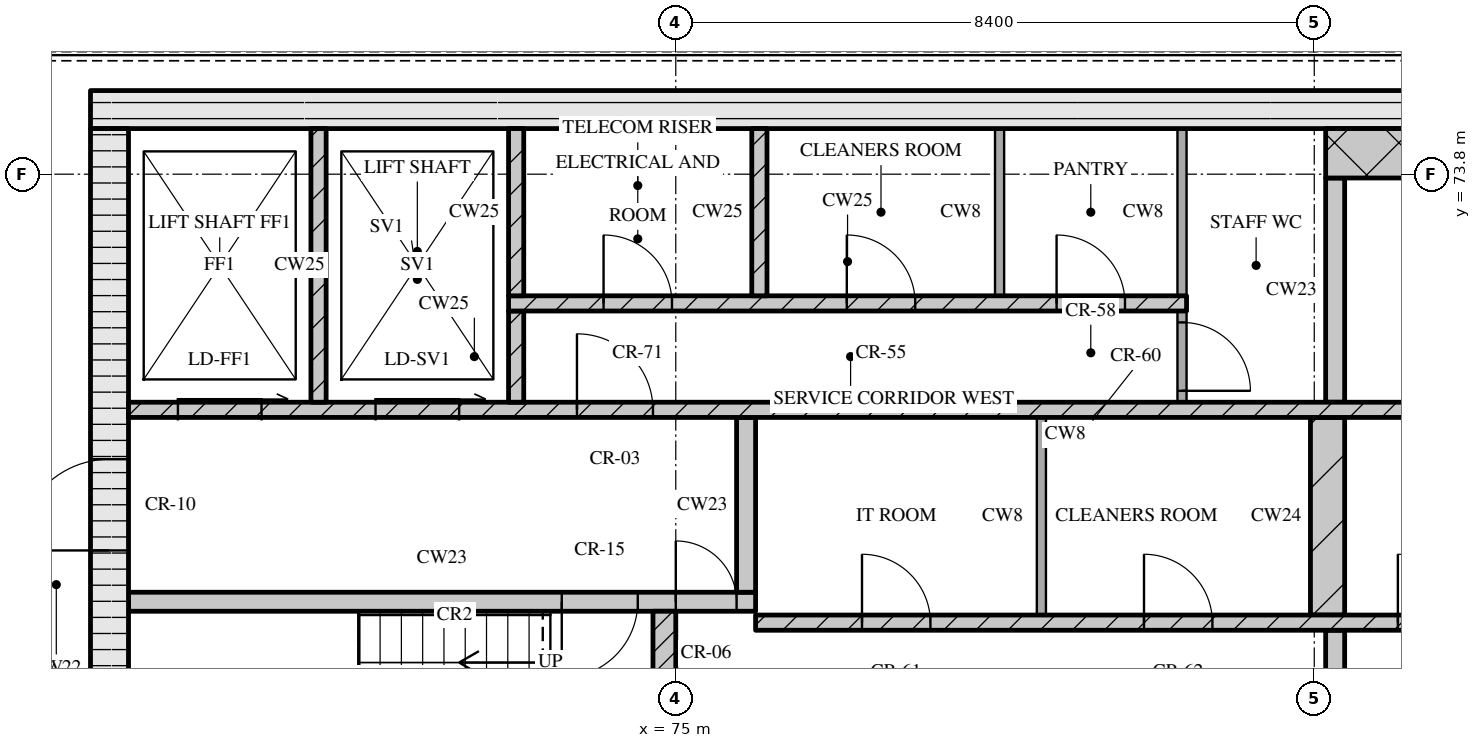
"""IFC4 building model, lengths in metres.
Left out: names, types, materials, properties, quantities, classifications, styles, units other than length and angle.
Written with IfcOpenShell. Run it as: python <this file> out.ifc"""

import sys

from ifc_helpers import new_model, si_unit, direction, frame, frame_2d, origin, place, context, subcontext, project, spatial, rectangle, extrude, element, fill, save


model = new_model("IFC4")
c1 = context("Model", 3, precision=1e-05, world=origin(), true_north=direction((0.0, 1.0)))
c2 = subcontext(c1, "Body", "Model", "MODEL_VIEW")
j1 = project(units=[si_unit("LENGTHUNIT", "METRE"), si_unit("PLANEANGLEUNIT", "RADIAN")], contexts=[c1])
p1 = place(None, origin())
s1 = spatial("IfcSite", under=j1, at=p1, CompositionType="ELEMENT")
p2 = place(p1, origin())
s2 = spatial("IfcBuilding", under=s1, at=p2, CompositionType="ELEMENT")
p3 = place(p2, frame((0.0, 0.0, 299.55)))
s3 = spatial("IfcBuildingStorey", under=s2, at=p3, CompositionType="ELEMENT", Elevation=299.55)
p4 = place(p3, frame((67.3, 74.65, 0.0), z_axis=(0.0, 0.0, 1.0), x_axis=(1.0, 0.0, 0.0)))
e1 = element("IfcWall", 1, at=p4, inside=s3, PredefinedType="SOLIDWALL", context=c2, shape_type="SweptSolid", body=[
    extrude(rectangle(XDim=40.6, YDim=0.5, at=frame_2d((20.3, 0.0))), origin(), (0.0, 0.0, 1.0), 3.32),
])
p5 = place(p3, frame((67.55, 62.4, 0.0), z_axis=(0.0, 0.0, 1.0), x_axis=(0.0, 1.0, 0.0)))
e2 = element("IfcWall", 2, at=p5, inside=s3, PredefinedType="SOLIDWALL", context=c2, shape_type="SweptSolid", body=[
    extrude(rectangle(XDim=12.0, YDim=0.5, at=frame_2d((6.0, 0.0))), origin(), (0.0, 0.0, 1.0), 3.32),
])
p6 = place(p5, frame((6.45, 0.0, 0.0)))
e3 = element("IfcOpeningElement", 3, at=p6, cuts=e2, PredefinedType="OPENING", context=c2, shape_type="SweptSolid", body=[
    extrude(rectangle(XDim=1.2, YDim=2.1, at=frame_2d((0.6, 1.05))), frame((0.0, 0.26, 0.0), z_axis=(0.0, -1.0, 0.0), x_axis=(1.0, 0.0, 0.0)), (0.0, 0.0, 1.0), 0.52),
])
p7 = place(p3, frame((74.85, 65.2, 0.0), z_axis=(0.0, 0.0, 1.0), x_axis=(0.0, 1.0, 0.0)))
e4 = element("IfcWall", 4, at=p7, inside=s3, PredefinedType="SOLIDWALL", context=c2, shape_type="SweptSolid", body=[
    extrude(rectangle(XDim=2.85, YDim=0.3, at=frame_2d((1.425, 0.0))), origin(), (0.0, 0.0, 1.0), 3.32),
])
p8 = place(p3, frame((83.675, 65.2, 0.0), z_axis=(0.0, 0.0, 1.0), x_axis=(0.0, 1.0, 0.0)))
e5 = element("IfcWall", 5, at=p8, inside=s3, PredefinedType="SOLIDWALL", context=c2, shape_type="SweptSolid", body=[
    extrude(rectangle(XDim=2.6, YDim=0.25, at=frame_2d((1.3, 0.0))), origin(), (0.0, 0.0, 1.0), 3.32),
])
p9 = place(p8, frame((0.7, 0.0, 0.0)))
e6 = element("IfcOpeningElement", 6, at=p9, cuts=e5, PredefinedType="OPENING", context=c2, shape_type="SweptSolid", body=[
    extrude(rectangle(XDim=1.2, YDim=2.1, at=frame_2d((0.6, 1.05))), frame((0.0, 0.135, 0.0), z_axis=(0.0, -1.0, 0.0), x_axis=(1.0, 0.0, 0.0)), (0.0, 0.0, 1.0), 0.27),
])
p10 = place(p3, frame((76.05, 67.9, 0.0), z_axis=(0.0, 0.0, 1.0), x_axis=(1.0, 0.0, 0.0)))
e7 = element("IfcWall", 7, at=p10, inside=s3, PredefinedType="SOLIDWALL", context=c2, shape_type="SweptSolid", body=[
    extrude(rectangle(XDim=23.1, YDim=0.2, at=frame_2d((11.55, 0.0))), origin(), (0.0, 0.0, 1.0), 3.32),
])
p11 = place(p10, frame((1.4, 0.0, 0.0)))
e8 = element("IfcOpeningElement", 8, at=p11, cuts=e7, PredefinedType="OPENING", context=c2, shape_type="SweptSolid", body=[
    extrude(rectangle(XDim=0.9, YDim=2.1, at=frame_2d((0.45, 1.05))), frame((0.0, 0.11, 0.0), z_axis=(0.0, -1.0, 0.0), x_axis=(1.0, 0.0, 0.0)), (0.0, 0.0, 1.0), 0.22),
])
p12 = place(p10, frame((5.11, 0.0, 0.0)))
e9 = element("IfcOpeningElement", 9, at=p12, cuts=e7, PredefinedType="OPENING", context=c2, shape_type="SweptSolid", body=[
    extrude(rectangle(XDim=0.9, YDim=2.1, at=frame_2d((0.45, 1.05))), frame((0.0, 0.11, 0.0), z_axis=(0.0, -1.0, 0.0), x_axis=(1.0, 0.0, 0.0)), (0.0, 0.0, 1.0), 0.22),
])
p13 = place(p10, frame((8.45, 0.0, 0.0)))
e10 = element("IfcOpeningElement", 10, at=p13, cuts=e7, PredefinedType="OPENING", context=c2, shape_type="SweptSolid", body=[
    extrude(rectangle(XDim=0.9, YDim=2.1, at=frame_2d((0.45, 1.05))), frame((0.0, 0.11, 0.0), z_axis=(0.0, -1.0, 0.0), x_axis=(1.0, 0.0, 0.0)), (0.0, 0.0, 1.0), 0.22),
])
p14 = place(p10, frame((10.91, 0.0, 0.0)))
e11 = element("IfcOpeningElement", 11, at=p14, cuts=e7, PredefinedType="OPENING", context=c2, shape_type="SweptSolid", body=[
    extrude(rectangle(XDim=0.9, YDim=2.1, at=frame_2d((0.45, 1.05))), frame((0.0, 0.11, 0.0), z_axis=(0.0, -1.0, 0.0), x_axis=(1.0, 0.0, 0.0)), (0.0, 0.0, 1.0), 0.22),
])
p15 = place(p10, frame((13.55, 0.0, 0.0)))
e12 = element("IfcOpeningElement", 12, at=p15, cuts=e7, PredefinedType="OPENING", context=c2, shape_type="SweptSolid", body=[
    extrude(rectangle(XDim=1.0, YDim=2.1, at=frame_2d((0.5, 1.05))), frame((0.0, 0.11, 0.0), z_axis=(0.0, -1.0, 0.0), x_axis=(1.0, 0.0, 0.0)), (0.0, 0.0, 1.0), 0.22),
])
p16 = place(p10, frame((16.2, 0.0, 0.0)))
e13 = element("IfcOpeningElement", 13, at=p16, cuts=e7, PredefinedType="OPENING", context=c2, shape_type="SweptSolid", body=[
    extrude(rectangle(XDim=1.1, YDim=2.1, at=frame_2d((0.55, 1.05))), frame((0.0, 0.11, 0.0), z_axis=(0.0, -1.0, 0.0), x_axis=(1.0, 0.0, 0.0)), (0.0, 0.0, 1.0), 0.22),
])
p17 = place(p10, frame((18.7, 0.0, 0.0)))
e14 = element("IfcOpeningElement", 14, at=p17, cuts=e7, PredefinedType="OPENING", context=c2, shape_type="SweptSolid", body=[
    extrude(rectangle(XDim=1.1, YDim=2.1, at=frame_2d((0.55, 1.05))), frame((0.0, 0.11, 0.0), z_axis=(0.0, -1.0, 0.0), x_axis=(1.0, 0.0, 0.0)), (0.0, 0.0, 1.0), 0.22),
])
p18 = place(p10, frame((21.2, 0.0, 0.0)))
e15 = element("IfcOpeningElement", 15, at=p18, cuts=e7, PredefinedType="OPENING", context=c2, shape_type="SweptSolid", body=[
    extrude(rectangle(XDim=1.1, YDim=2.1, at=frame_2d((0.55, 1.05))), frame((0.0, 0.11, 0.0), z_axis=(0.0, -1.0, 0.0), x_axis=(1.0, 0.0, 0.0)), (0.0, 0.0, 1.0), 0.22),
])
p19 = place(p3, frame((79.81, 68.0, 0.0), z_axis=(0.0, 0.0, 1.0), x_axis=(0.0, 1.0, 0.0)))
e16 = element("IfcWall", 16, at=p19, inside=s3, PredefinedType="PARTITIONING", context=c2, shape_type="SweptSolid", body=[
    extrude(rectangle(XDim=2.6, YDim=0.12, at=frame_2d((1.3, 0.0))), origin(), (0.0, 0.0, 1.0), 3.32),
])
p20 = place(p3, frame((83.575, 68.0, 0.0), z_axis=(0.0, 0.0, 1.0), x_axis=(0.0, 1.0, 0.0)))
e17 = element("IfcWall", 17, at=p20, inside=s3, PredefinedType="SOLIDWALL", context=c2, shape_type="SweptSolid", body=[
    extrude(rectangle(XDim=2.6, YDim=0.45, at=frame_2d((1.3, 0.0))), origin(), (0.0, 0.0, 1.0), 3.32),
])
p21 = place(p3, frame((67.8, 68.175, 0.0), z_axis=(0.0, 0.0, 1.0), x_axis=(1.0, 0.0, 0.0)))
e18 = element("IfcWall", 18, at=p21, inside=s3, PredefinedType="SOLIDWALL", context=c2, shape_type="SweptSolid", body=[
    extrude(rectangle(XDim=8.25, YDim=0.25, at=frame_2d((4.125, 0.0))), origin(), (0.0, 0.0, 1.0), 3.32),
])
p22 = place(p21, frame((5.7, 0.0, 0.0)))
e19 = element("IfcOpeningElement", 19, at=p22, cuts=e18, PredefinedType="OPENING", context=c2, shape_type="SweptSolid", body=[
    extrude(rectangle(XDim=1.0, YDim=2.1, at=frame_2d((0.5, 1.05))), frame((0.0, 0.135, 0.0), z_axis=(0.0, -1.0, 0.0), x_axis=(1.0, 0.0, 0.0)), (0.0, 0.0, 1.0), 0.27),
])
p23 = place(p21, frame((7.2, 0.0, 0.0)))
e20 = element("IfcOpeningElement", 20, at=p23, cuts=e18, PredefinedType="OPENING", context=c2, shape_type="SweptSolid", body=[
    extrude(rectangle(XDim=0.8, YDim=2.1, at=frame_2d((0.4, 1.05))), frame((0.0, 0.135, 0.0), z_axis=(0.0, -1.0, 0.0), x_axis=(1.0, 0.0, 0.0)), (0.0, 0.0, 1.0), 0.27),
])
p24 = place(p3, frame((75.925, 68.3, 0.0), z_axis=(0.0, 0.0, 1.0), x_axis=(0.0, 1.0, 0.0)))
e21 = element("IfcWall", 21, at=p24, inside=s3, PredefinedType="SOLIDWALL", context=c2, shape_type="SweptSolid", body=[
    extrude(rectangle(XDim=2.3, YDim=0.25, at=frame_2d((1.15, 0.0))), origin(), (0.0, 0.0, 1.0), 3.32),
])
p25 = place(p3, frame((67.8, 70.7, 0.0), z_axis=(0.0, 0.0, 1.0), x_axis=(1.0, 0.0, 0.0)))
e22 = element("IfcWall", 22, at=p25, inside=s3, PredefinedType="SOLIDWALL", context=c2, shape_type="SweptSolid", body=[
    extrude(rectangle(XDim=39.6, YDim=0.2, at=frame_2d((19.8, 0.0))), origin(), (0.0, 0.0, 1.0), 3.32),
])
p26 = place(p25, frame((0.65, 0.0, 0.0)))
e23 = element("IfcOpeningElement", 23, at=p26, cuts=e22, PredefinedType="OPENING", context=c2, shape_type="SweptSolid", body=[
    extrude(rectangle(XDim=1.1, YDim=2.1, at=frame_2d((0.55, 1.05))), frame((0.0, 0.11, 0.0), z_axis=(0.0, -1.0, 0.0), x_axis=(1.0, 0.0, 0.0)), (0.0, 0.0, 1.0), 0.22),
])
p27 = place(p25, frame((3.25, 0.0, 0.0)))
e24 = element("IfcOpeningElement", 24, at=p27, cuts=e22, PredefinedType="OPENING", context=c2, shape_type="SweptSolid", body=[
    extrude(rectangle(XDim=1.1, YDim=2.1, at=frame_2d((0.55, 1.05))), frame((0.0, 0.11, 0.0), z_axis=(0.0, -1.0, 0.0), x_axis=(1.0, 0.0, 0.0)), (0.0, 0.0, 1.0), 0.22),
])
p28 = place(p25, frame((5.9, 0.0, 0.0)))
e25 = element("IfcOpeningElement", 25, at=p28, cuts=e22, PredefinedType="OPENING", context=c2, shape_type="SweptSolid", body=[
    extrude(rectangle(XDim=1.0, YDim=2.1, at=frame_2d((0.5, 1.05))), frame((0.0, 0.11, 0.0), z_axis=(0.0, -1.0, 0.0), x_axis=(1.0, 0.0, 0.0)), (0.0, 0.0, 1.0), 0.22),
])
p29 = place(p25, frame((21.7, 0.0, 0.0)))
e26 = element("IfcOpeningElement", 26, at=p29, cuts=e22, PredefinedType="OPENING", context=c2, shape_type="SweptSolid", body=[
    extrude(rectangle(XDim=1.0, YDim=2.1, at=frame_2d((0.5, 1.05))), frame((0.0, 0.11, 0.0), z_axis=(0.0, -1.0, 0.0), x_axis=(1.0, 0.0, 0.0)), (0.0, 0.0, 1.0), 0.22),
])
p30 = place(p25, frame((32.7, 0.0, 0.0)))
e27 = element("IfcOpeningElement", 27, at=p30, cuts=e22, PredefinedType="OPENING", context=c2, shape_type="SweptSolid", body=[
    extrude(rectangle(XDim=1.0, YDim=2.1, at=frame_2d((0.5, 1.05))), frame((0.0, 0.11, 0.0), z_axis=(0.0, -1.0, 0.0), x_axis=(1.0, 0.0, 0.0)), (0.0, 0.0, 1.0), 0.22),
])
p31 = place(p25, frame((35.25, 0.0, 0.0)))
e28 = element("IfcOpeningElement", 28, at=p31, cuts=e22, PredefinedType="OPENING", context=c2, shape_type="SweptSolid", body=[
    extrude(rectangle(XDim=1.1, YDim=2.1, at=frame_2d((0.55, 1.05))), frame((0.0, 0.11, 0.0), z_axis=(0.0, -1.0, 0.0), x_axis=(1.0, 0.0, 0.0)), (0.0, 0.0, 1.0), 0.22),
])
p32 = place(p25, frame((37.85, 0.0, 0.0)))
e29 = element("IfcOpeningElement", 29, at=p32, cuts=e22, PredefinedType="OPENING", context=c2, shape_type="SweptSolid", body=[
    extrude(rectangle(XDim=1.1, YDim=2.1, at=frame_2d((0.55, 1.05))), frame((0.0, 0.11, 0.0), z_axis=(0.0, -1.0, 0.0), x_axis=(1.0, 0.0, 0.0)), (0.0, 0.0, 1.0), 0.22),
])
p33 = place(p3, frame((70.3, 70.8, 0.0), z_axis=(0.0, 0.0, 1.0), x_axis=(0.0, 1.0, 0.0)))
e30 = element("IfcWall", 30, at=p33, inside=s3, PredefinedType="SOLIDWALL", context=c2, shape_type="SweptSolid", body=[
    extrude(rectangle(XDim=3.6, YDim=0.2, at=frame_2d((1.8, 0.0))), origin(), (0.0, 0.0, 1.0), 3.32),
])
p34 = place(p3, frame((72.9, 70.8, 0.0), z_axis=(0.0, 0.0, 1.0), x_axis=(0.0, 1.0, 0.0)))
e31 = element("IfcWall", 31, at=p34, inside=s3, PredefinedType="SOLIDWALL", context=c2, shape_type="SweptSolid", body=[
    extrude(rectangle(XDim=1.2, YDim=0.2, at=frame_2d((0.6, 0.0))), origin(), (0.0, 0.0, 1.0), 3.32),
])
p35 = place(p3, frame((81.66, 70.8, 0.0), z_axis=(0.0, 0.0, 1.0), x_axis=(0.0, 1.0, 0.0)))
e32 = element("IfcWall", 32, at=p35, inside=s3, PredefinedType="PARTITIONING", context=c2, shape_type="SweptSolid", body=[
    extrude(rectangle(XDim=1.2, YDim=0.12, at=frame_2d((0.6, 0.0))), origin(), (0.0, 0.0, 1.0), 3.32),
])
p36 = place(p35, frame((0.15, 0.0, 0.0)))
e33 = element("IfcOpeningElement", 33, at=p36, cuts=e32, PredefinedType="OPENING", context=c2, shape_type="SweptSolid", body=[
    extrude(rectangle(XDim=0.9, YDim=2.1, at=frame_2d((0.45, 1.05))), frame((0.0, 0.07, 0.0), z_axis=(0.0, -1.0, 0.0), x_axis=(1.0, 0.0, 0.0)), (0.0, 0.0, 1.0), 0.14),
])
p37 = place(p3, frame((83.675, 70.8, 0.0), z_axis=(0.0, 0.0, 1.0), x_axis=(0.0, 1.0, 0.0)))
e34 = element("IfcWall", 34, at=p37, inside=s3, PredefinedType="SOLIDWALL", context=c2, shape_type="SweptSolid", body=[
    extrude(rectangle(XDim=2.95, YDim=0.25, at=frame_2d((1.475, 0.0))), origin(), (0.0, 0.0, 1.0), 3.32),
])
p38 = place(p3, frame((72.8, 72.1, 0.0), z_axis=(0.0, 0.0, 1.0), x_axis=(1.0, 0.0, 0.0)))
e35 = element("IfcWall", 35, at=p38, inside=s3, PredefinedType="SOLIDWALL", context=c2, shape_type="SweptSolid", body=[
    extrude(rectangle(XDim=8.92, YDim=0.2, at=frame_2d((4.46, 0.0))), origin(), (0.0, 0.0, 1.0), 3.32),
])
p39 = place(p38, frame((1.25, 0.0, 0.0)))
e36 = element("IfcOpeningElement", 36, at=p39, cuts=e35, PredefinedType="OPENING", context=c2, shape_type="SweptSolid", body=[
    extrude(rectangle(XDim=0.9, YDim=2.1, at=frame_2d((0.45, 1.05))), frame((0.0, 0.11, 0.0), z_axis=(0.0, -1.0, 0.0), x_axis=(1.0, 0.0, 0.0)), (0.0, 0.0, 1.0), 0.22),
])
p40 = place(p38, frame((4.45, 0.0, 0.0)))
e37 = element("IfcOpeningElement", 37, at=p40, cuts=e35, PredefinedType="OPENING", context=c2, shape_type="SweptSolid", body=[
    extrude(rectangle(XDim=0.9, YDim=2.1, at=frame_2d((0.45, 1.05))), frame((0.0, 0.11, 0.0), z_axis=(0.0, -1.0, 0.0), x_axis=(1.0, 0.0, 0.0)), (0.0, 0.0, 1.0), 0.22),
])
p41 = place(p38, frame((7.21, 0.0, 0.0)))
e38 = element("IfcOpeningElement", 38, at=p41, cuts=e35, PredefinedType="OPENING", context=c2, shape_type="SweptSolid", body=[
    extrude(rectangle(XDim=0.9, YDim=2.1, at=frame_2d((0.45, 1.05))), frame((0.0, 0.11, 0.0), z_axis=(0.0, -1.0, 0.0), x_axis=(1.0, 0.0, 0.0)), (0.0, 0.0, 1.0), 0.22),
])
for number, where, z_axis, x_axis in (
    (39, (72.9, 72.2, 0.0), (0.0, 0.0, 1.0), (0.0, 1.0, 0.0)),
    (40, (76.1, 72.2, 0.0), (0.0, 0.0, 1.0), (0.0, 1.0, 0.0)),
):
    element("IfcWall", number, at=place(p3, frame(where, z_axis=z_axis, x_axis=x_axis)), inside=s3, PredefinedType="SOLIDWALL", context=c2, shape_type="SweptSolid", body=[
        extrude(rectangle(XDim=2.2, YDim=0.2, at=frame_2d((1.1, 0.0))), origin(), (0.0, 0.0, 1.0), 3.32),
    ])
for number, where, z_axis, x_axis in (
    (41, (79.26, 72.2, 0.0), (0.0, 0.0, 1.0), (0.0, 1.0, 0.0)),
    (42, (81.66, 72.2, 0.0), (0.0, 0.0, 1.0), (0.0, 1.0, 0.0)),
):
    element("IfcWall", number, at=place(p3, frame(where, z_axis=z_axis, x_axis=x_axis)), inside=s3, PredefinedType="PARTITIONING", context=c2, shape_type="SweptSolid", body=[
        extrude(rectangle(XDim=2.2, YDim=0.12, at=frame_2d((1.1, 0.0))), origin(), (0.0, 0.0, 1.0), 3.32),
    ])
p42 = place(p3, frame((83.55, 74.075, 0.0), z_axis=(0.0, 0.0, 1.0), x_axis=(1.0, 0.0, 0.0)))
e43 = element("IfcWall", 43, at=p42, inside=s3, PredefinedType="SOLIDWALL", context=c2, shape_type="SweptSolid", body=[
    extrude(rectangle(XDim=8.1, YDim=0.65, at=frame_2d((4.05, 0.0))), origin(), (0.0, 0.0, 1.0), 3.32),
])
p43 = place(p11, origin())
e44 = element("IfcDoor", 44, at=p43, inside=s3, OperationType="SINGLE_SWING_LEFT", PredefinedType="DOOR", context=c2, shape_type="SweptSolid", body=[
    extrude(rectangle(XDim=0.9, YDim=2.1, at=frame_2d((0.45, 1.05))), frame((0.0, 0.025, 0.0), z_axis=(0.0, -1.0, 0.0), x_axis=(1.0, 0.0, 0.0)), (0.0, 0.0, 1.0), 0.05),
])
fill(e8, e44)
p44 = place(p12, origin())
e45 = element("IfcDoor", 45, at=p44, inside=s3, OperationType="SINGLE_SWING_LEFT", PredefinedType="DOOR", context=c2, shape_type="SweptSolid", body=[
    extrude(rectangle(XDim=0.9, YDim=2.1, at=frame_2d((0.45, 1.05))), frame((0.0, 0.025, 0.0), z_axis=(0.0, -1.0, 0.0), x_axis=(1.0, 0.0, 0.0)), (0.0, 0.0, 1.0), 0.05),
])
fill(e9, e45)
p45 = place(p13, origin())
e46 = element("IfcDoor", 46, at=p45, inside=s3, OperationType="SINGLE_SWING_LEFT", PredefinedType="DOOR", context=c2, shape_type="SweptSolid", body=[
    extrude(rectangle(XDim=0.9, YDim=2.1, at=frame_2d((0.45, 1.05))), frame((0.0, 0.025, 0.0), z_axis=(0.0, -1.0, 0.0), x_axis=(1.0, 0.0, 0.0)), (0.0, 0.0, 1.0), 0.05),
])
fill(e10, e46)
p46 = place(p22, origin())
e47 = element("IfcDoor", 47, at=p46, inside=s3, OperationType="SINGLE_SWING_RIGHT", PredefinedType="DOOR", context=c2, shape_type="SweptSolid", body=[
    extrude(rectangle(XDim=1.0, YDim=2.1, at=frame_2d((0.5, 1.05))), frame((0.0, 0.025, 0.0), z_axis=(0.0, -1.0, 0.0), x_axis=(1.0, 0.0, 0.0)), (0.0, 0.0, 1.0), 0.05),
])
fill(e19, e47)
p47 = place(p23, origin())
e48 = element("IfcDoor", 48, at=p47, inside=s3, OperationType="SINGLE_SWING_LEFT", PredefinedType="DOOR", context=c2, shape_type="SweptSolid", body=[
    extrude(rectangle(XDim=0.8, YDim=2.1, at=frame_2d((0.4, 1.05))), frame((0.0, 0.025, 0.0), z_axis=(0.0, -1.0, 0.0), x_axis=(1.0, 0.0, 0.0)), (0.0, 0.0, 1.0), 0.05),
])
fill(e20, e48)
p48 = place(p6, origin())
e49 = element("IfcDoor", 49, at=p48, inside=s3, OperationType="SINGLE_SWING_LEFT", PredefinedType="DOOR", context=c2, shape_type="SweptSolid", body=[
    extrude(rectangle(XDim=1.2, YDim=2.1, at=frame_2d((0.6, 1.05))), frame((0.0, 0.025, 0.0), z_axis=(0.0, -1.0, 0.0), x_axis=(1.0, 0.0, 0.0)), (0.0, 0.0, 1.0), 0.05),
])
fill(e3, e49)
p49 = place(p26, origin())
e50 = element("IfcDoor", 50, at=p49, inside=s3, OperationType="SLIDING_TO_RIGHT", PredefinedType="DOOR", context=c2, shape_type="SweptSolid", body=[
    extrude(rectangle(XDim=1.1, YDim=2.1, at=frame_2d((0.55, 1.05))), frame((0.0, 0.025, 0.0), z_axis=(0.0, -1.0, 0.0), x_axis=(1.0, 0.0, 0.0)), (0.0, 0.0, 1.0), 0.05),
])
fill(e23, e50)
p50 = place(p27, origin())
e51 = element("IfcDoor", 51, at=p50, inside=s3, OperationType="SLIDING_TO_RIGHT", PredefinedType="DOOR", context=c2, shape_type="SweptSolid", body=[
    extrude(rectangle(XDim=1.1, YDim=2.1, at=frame_2d((0.55, 1.05))), frame((0.0, 0.025, 0.0), z_axis=(0.0, -1.0, 0.0), x_axis=(1.0, 0.0, 0.0)), (0.0, 0.0, 1.0), 0.05),
])
fill(e24, e51)
p51 = place(p28, origin())
e52 = element("IfcDoor", 52, at=p51, inside=s3, OperationType="SINGLE_SWING_LEFT", PredefinedType="DOOR", context=c2, shape_type="SweptSolid", body=[
    extrude(rectangle(XDim=1.0, YDim=2.1, at=frame_2d((0.5, 1.05))), frame((0.0, 0.025, 0.0), z_axis=(0.0, -1.0, 0.0), x_axis=(1.0, 0.0, 0.0)), (0.0, 0.0, 1.0), 0.05),
])
fill(e25, e52)
p52 = place(p36, origin())
e53 = element("IfcDoor", 53, at=p52, inside=s3, OperationType="SINGLE_SWING_RIGHT", PredefinedType="DOOR", context=c2, shape_type="SweptSolid", body=[
    extrude(rectangle(XDim=0.9, YDim=2.1, at=frame_2d((0.45, 1.05))), frame((0.0, 0.025, 0.0), z_axis=(0.0, -1.0, 0.0), x_axis=(1.0, 0.0, 0.0)), (0.0, 0.0, 1.0), 0.05),
])
fill(e33, e53)
p53 = place(p39, origin())
e54 = element("IfcDoor", 54, at=p53, inside=s3, OperationType="SINGLE_SWING_LEFT", PredefinedType="DOOR", context=c2, shape_type="SweptSolid", body=[
    extrude(rectangle(XDim=0.9, YDim=2.1, at=frame_2d((0.45, 1.05))), frame((0.0, 0.025, 0.0), z_axis=(0.0, -1.0, 0.0), x_axis=(1.0, 0.0, 0.0)), (0.0, 0.0, 1.0), 0.05),
])
fill(e36, e54)
p54 = place(p40, origin())
e55 = element("IfcDoor", 55, at=p54, inside=s3, OperationType="SINGLE_SWING_LEFT", PredefinedType="DOOR", context=c2, shape_type="SweptSolid", body=[
    extrude(rectangle(XDim=0.9, YDim=2.1, at=frame_2d((0.45, 1.05))), frame((0.0, 0.025, 0.0), z_axis=(0.0, -1.0, 0.0), x_axis=(1.0, 0.0, 0.0)), (0.0, 0.0, 1.0), 0.05),
])
fill(e37, e55)
p55 = place(p41, origin())
e56 = element("IfcDoor", 56, at=p55, inside=s3, OperationType="SINGLE_SWING_LEFT", PredefinedType="DOOR", context=c2, shape_type="SweptSolid", body=[
    extrude(rectangle(XDim=0.9, YDim=2.1, at=frame_2d((0.45, 1.05))), frame((0.0, 0.025, 0.0), z_axis=(0.0, -1.0, 0.0), x_axis=(1.0, 0.0, 0.0)), (0.0, 0.0, 1.0), 0.05),
])
fill(e38, e56)
save(model, sys.argv[1])
